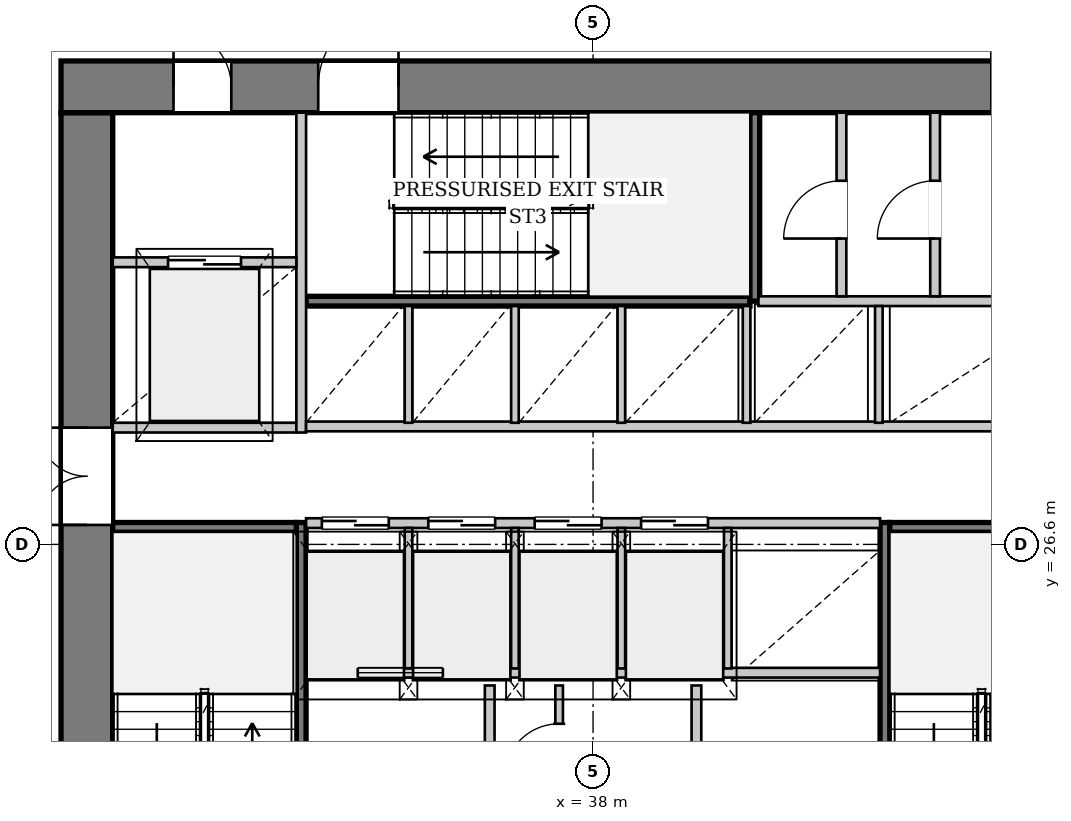
"""IFC4 building model, lengths in metres.
Left out: names, types, materials, properties, quantities, classifications, styles, units other than length and angle.
Written with IfcOpenShell. Run it as: python <this file> out.ifc"""

import sys

from ifc_helpers import new_model, si_unit, direction, frame, frame_2d, origin, place, context, subcontext, project, spatial, rectangle, extrude, source, transform, mapped, element, fill, save


model = new_model("IFC4")
c1 = context("Model", 3, precision=1e-05, world=origin(), true_north=direction((0.0, 1.0)))
c2 = subcontext(c1, "Body", "Model", "MODEL_VIEW")
j1 = project(units=[si_unit("LENGTHUNIT", "METRE"), si_unit("PLANEANGLEUNIT", "RADIAN")], contexts=[c1])
p1 = place(None, origin())
s1 = spatial("IfcSite", under=j1, at=p1, CompositionType="ELEMENT")
p2 = place(p1, origin())
s2 = spatial("IfcBuilding", under=s1, at=p2, CompositionType="ELEMENT")
p3 = place(p2, frame((0.0, 0.0, 75.9)))
s3 = spatial("IfcBuildingStorey", under=s2, at=p3, CompositionType="ELEMENT", Elevation=75.9)
p4 = place(p3, frame((29.675, 19.5, 0.0), z_axis=(0.0, 0.0, 1.0), x_axis=(0.0, 1.0, 0.0)))
e1 = element("IfcWall", 1, at=p4, inside=s3, PredefinedType="SHEAR", context=c2, shape_type="SweptSolid", body=[
    extrude(rectangle(XDim=14.2, YDim=0.85, at=frame_2d((7.1, 0.0))), origin(), (0.0, 0.0, 1.0), 3.58),
])
p5 = place(p4, frame((7.42, 0.0, 0.0)))
e2 = element("IfcOpeningElement", 2, at=p5, cuts=e1, PredefinedType="OPENING", context=c2, shape_type="SweptSolid", body=[
    extrude(rectangle(XDim=1.6, YDim=2.2, at=frame_2d((0.8, 1.1))), frame((0.0, 0.435, 0.0), z_axis=(0.0, -1.0, 0.0), x_axis=(1.0, 0.0, 0.0)), (0.0, 0.0, 1.0), 0.87),
])
p6 = place(p3, frame((29.25, 34.125, 0.0), z_axis=(0.0, 0.0, 1.0), x_axis=(1.0, 0.0, 0.0)))
e3 = element("IfcWall", 3, at=p6, inside=s3, PredefinedType="SHEAR", context=c2, shape_type="SweptSolid", body=[
    extrude(rectangle(XDim=17.5, YDim=0.85, at=frame_2d((8.75, 0.0))), origin(), (0.0, 0.0, 1.0), 3.58),
])
p7 = place(p6, frame((1.85, 0.0, 0.0)))
e4 = element("IfcOpeningElement", 4, at=p7, cuts=e3, PredefinedType="OPENING", context=c2, shape_type="SweptSolid", body=[
    extrude(rectangle(XDim=0.95, YDim=2.1, at=frame_2d((0.475, 1.05))), frame((0.0, 0.435, 0.0), z_axis=(0.0, -1.0, 0.0), x_axis=(1.0, 0.0, 0.0)), (0.0, 0.0, 1.0), 0.87),
])
p8 = place(p6, frame((4.23, 0.0, 0.0)))
e5 = element("IfcOpeningElement", 5, at=p8, cuts=e3, PredefinedType="OPENING", context=c2, shape_type="SweptSolid", body=[
    extrude(rectangle(XDim=1.32, YDim=2.2, at=frame_2d((0.66, 1.1))), frame((0.0, 0.435, 0.0), z_axis=(0.0, -1.0, 0.0), x_axis=(1.0, 0.0, 0.0)), (0.0, 0.0, 1.0), 0.87),
])
p9 = place(p6, frame((15.3, 0.0, 0.0)))
e6 = element("IfcOpeningElement", 6, at=p9, cuts=e3, PredefinedType="OPENING", context=c2, shape_type="SweptSolid", body=[
    extrude(rectangle(XDim=0.95, YDim=2.1, at=frame_2d((0.475, 1.05))), frame((0.0, 0.435, 0.0), z_axis=(0.0, -1.0, 0.0), x_axis=(1.0, 0.0, 0.0)), (0.0, 0.0, 1.0), 0.87),
])
p10 = place(p3, frame((33.2, 19.5, 0.0), z_axis=(0.0, 0.0, 1.0), x_axis=(0.0, 1.0, 0.0)))
e7 = element("IfcWall", 7, at=p10, inside=s3, PredefinedType="PARTITIONING", context=c2, shape_type="SweptSolid", body=[
    extrude(rectangle(XDim=7.46, YDim=0.16, at=frame_2d((3.73, 0.0))), origin(), (0.0, 0.0, 1.0), 3.58),
])
p11 = place(p10, frame((0.08, 0.0, 0.0)))
e8 = element("IfcOpeningElement", 8, at=p11, cuts=e7, PredefinedType="OPENING", context=c2, shape_type="SweptSolid", body=[
    extrude(rectangle(XDim=1.32, YDim=2.2, at=frame_2d((0.66, 1.1))), frame((0.0, 0.09, 0.0), z_axis=(0.0, -1.0, 0.0), x_axis=(1.0, 0.0, 0.0)), (0.0, 0.0, 1.0), 0.18),
])
p12 = place(p3, frame((30.1, 26.88, 0.0), z_axis=(0.0, 0.0, 1.0), x_axis=(1.0, 0.0, 0.0)))
e9 = element("IfcWall", 9, at=p12, inside=s3, PredefinedType="PARTITIONING", context=c2, shape_type="SweptSolid", body=[
    extrude(rectangle(XDim=3.02, YDim=0.16, at=frame_2d((1.51, 0.0))), origin(), (0.0, 0.0, 1.0), 3.58),
])
p13 = place(p3, frame((42.8, 26.96, 0.0), z_axis=(0.0, 0.0, 1.0), x_axis=(0.0, -1.0, 0.0)))
e10 = element("IfcWall", 10, at=p13, inside=s3, PredefinedType="PARTITIONING", context=c2, shape_type="SweptSolid", body=[
    extrude(rectangle(XDim=7.46, YDim=0.16, at=frame_2d((3.73, 0.0))), origin(), (0.0, 0.0, 1.0), 3.58),
])
p14 = place(p13, frame((6.06, 0.0, 0.0)))
e11 = element("IfcOpeningElement", 11, at=p14, cuts=e10, PredefinedType="OPENING", context=c2, shape_type="SweptSolid", body=[
    extrude(rectangle(XDim=1.32, YDim=2.2, at=frame_2d((0.66, 1.1))), frame((0.0, 0.09, 0.0), z_axis=(0.0, -1.0, 0.0), x_axis=(1.0, 0.0, 0.0)), (0.0, 0.0, 1.0), 0.18),
])
p15 = place(p3, frame((42.88, 26.88, 0.0), z_axis=(0.0, 0.0, 1.0), x_axis=(1.0, 0.0, 0.0)))
e12 = element("IfcWall", 12, at=p15, inside=s3, PredefinedType="PARTITIONING", context=c2, shape_type="SweptSolid", body=[
    extrude(rectangle(XDim=3.02, YDim=0.16, at=frame_2d((1.51, 0.0))), origin(), (0.0, 0.0, 1.0), 3.58),
])
p16 = place(p3, frame((33.28, 30.6, 0.0), z_axis=(0.0, 0.0, 1.0), x_axis=(1.0, 0.0, 0.0)))
e13 = element("IfcWall", 13, at=p16, inside=s3, PredefinedType="PARTITIONING", context=c2, shape_type="SweptSolid", body=[
    extrude(rectangle(XDim=7.3, YDim=0.16, at=frame_2d((3.65, 0.0))), origin(), (0.0, 0.0, 1.0), 3.58),
])
p17 = place(p3, frame((40.66, 30.6, 0.0), z_axis=(0.0, 0.0, 1.0), x_axis=(0.0, 1.0, 0.0)))
e14 = element("IfcWall", 14, at=p17, inside=s3, PredefinedType="PARTITIONING", context=c2, shape_type="SweptSolid", body=[
    extrude(rectangle(XDim=3.1, YDim=0.16, at=frame_2d((1.55, 0.0))), origin(), (0.0, 0.0, 1.0), 3.58),
])
p18 = place(p3, frame((36.3, 19.5, 0.0), z_axis=(0.0, 0.0, 1.0), x_axis=(0.0, 1.0, 0.0)))
e15 = element("IfcWall", 15, at=p18, inside=s3, PredefinedType="PARTITIONING", context=c2, shape_type="SweptSolid", body=[
    extrude(rectangle(XDim=4.78, YDim=0.16, at=frame_2d((2.39, 0.0))), origin(), (0.0, 0.0, 1.0), 3.58),
])
p19 = place(p18, frame((0.6, 0.0, 0.0)))
e16 = element("IfcOpeningElement", 16, at=p19, cuts=e15, PredefinedType="OPENING", context=c2, shape_type="SweptSolid", body=[
    extrude(rectangle(XDim=1.2, YDim=2.2, at=frame_2d((0.6, 1.1))), frame((0.0, 0.09, 0.0), z_axis=(0.0, -1.0, 0.0), x_axis=(1.0, 0.0, 0.0)), (0.0, 0.0, 1.0), 0.18),
])
p20 = place(p18, frame((2.65, 0.0, 0.0)))
e17 = element("IfcOpeningElement", 17, at=p20, cuts=e15, PredefinedType="OPENING", context=c2, shape_type="SweptSolid", body=[
    extrude(rectangle(XDim=0.95, YDim=2.1, at=frame_2d((0.475, 1.05))), frame((0.0, 0.09, 0.0), z_axis=(0.0, -1.0, 0.0), x_axis=(1.0, 0.0, 0.0)), (0.0, 0.0, 1.0), 0.18),
])
p21 = place(p3, frame((39.7, 24.28, 0.0), z_axis=(0.0, 0.0, 1.0), x_axis=(0.0, -1.0, 0.0)))
e18 = element("IfcWall", 18, at=p21, inside=s3, PredefinedType="PARTITIONING", context=c2, shape_type="SweptSolid", body=[
    extrude(rectangle(XDim=4.78, YDim=0.16, at=frame_2d((2.39, 0.0))), origin(), (0.0, 0.0, 1.0), 3.58),
])
p22 = place(p21, frame((3.12, 0.0, 0.0)))
e19 = element("IfcOpeningElement", 19, at=p22, cuts=e18, PredefinedType="OPENING", context=c2, shape_type="SweptSolid", body=[
    extrude(rectangle(XDim=1.2, YDim=2.2, at=frame_2d((0.6, 1.1))), frame((0.0, 0.09, 0.0), z_axis=(0.0, -1.0, 0.0), x_axis=(1.0, 0.0, 0.0)), (0.0, 0.0, 1.0), 0.18),
])
p23 = place(p3, frame((33.28, 24.49, 0.0), z_axis=(0.0, 0.0, 1.0), x_axis=(1.0, 0.0, 0.0)))
e20 = element("IfcWall", 20, at=p23, inside=s3, PredefinedType="PARTITIONING", context=c2, shape_type="SweptSolid", body=[
    extrude(rectangle(XDim=9.44, YDim=0.16, at=frame_2d((4.72, 0.0))), origin(), (0.0, 0.0, 1.0), 3.58),
])
p24 = place(p23, frame((0.85, 0.0, 0.95)))
e21 = element("IfcOpeningElement", 21, at=p24, cuts=e20, PredefinedType="OPENING", context=c2, shape_type="SweptSolid", body=[
    extrude(rectangle(XDim=1.4, YDim=1.8, at=frame_2d((0.7, 0.9))), frame((0.0, 0.09, 0.0), z_axis=(0.0, -1.0, 0.0), x_axis=(1.0, 0.0, 0.0)), (0.0, 0.0, 1.0), 0.18),
])
p25 = place(p3, frame((37.442, 22.1, 0.0), z_axis=(0.0, 0.0, 1.0), x_axis=(0.0, 1.0, 0.0)))
e22 = element("IfcWall", 22, at=p25, inside=s3, PredefinedType="PARTITIONING", context=c2, shape_type="SweptSolid", body=[
    extrude(rectangle(XDim=2.18, YDim=0.125, at=frame_2d((1.09, 0.0))), origin(), (0.0, 0.0, 1.0), 3.58),
])
p26 = place(p25, frame((0.65, 0.0, 0.0)))
e23 = element("IfcOpeningElement", 23, at=p26, cuts=e22, PredefinedType="OPENING", context=c2, shape_type="SweptSolid", body=[
    extrude(rectangle(XDim=0.9, YDim=2.1, at=frame_2d((0.45, 1.05))), frame((0.0, 0.073, 0.0), z_axis=(0.0, -1.0, 0.0), x_axis=(1.0, 0.0, 0.0)), (0.0, 0.0, 1.0), 0.145),
])
p27 = place(p3, frame((30.1, 28.52, 0.0), z_axis=(0.0, 0.0, 1.0), x_axis=(1.0, 0.0, 0.0)))
e24 = element("IfcWall", 24, at=p27, inside=s3, PredefinedType="PARTITIONING", context=c2, shape_type="SweptSolid", body=[
    extrude(rectangle(XDim=3.02, YDim=0.16, at=frame_2d((1.51, 0.0))), origin(), (0.0, 0.0, 1.0), 3.58),
])
p28 = place(p3, frame((33.2, 28.44, 0.0), z_axis=(0.0, 0.0, 1.0), x_axis=(0.0, 1.0, 0.0)))
e25 = element("IfcWall", 25, at=p28, inside=s3, PredefinedType="PARTITIONING", context=c2, shape_type="SweptSolid", body=[
    extrude(rectangle(XDim=5.26, YDim=0.16, at=frame_2d((2.63, 0.0))), origin(), (0.0, 0.0, 1.0), 3.58),
])
p29 = place(p3, frame((30.1, 31.24, 0.0), z_axis=(0.0, 0.0, 1.0), x_axis=(1.0, 0.0, 0.0)))
e26 = element("IfcWall", 26, at=p29, inside=s3, PredefinedType="PARTITIONING", context=c2, shape_type="SweptSolid", body=[
    extrude(rectangle(XDim=3.02, YDim=0.16, at=frame_2d((1.51, 0.0))), origin(), (0.0, 0.0, 1.0), 3.58),
])
p30 = place(p29, frame((0.91, 0.0, 0.0)))
e27 = element("IfcOpeningElement", 27, at=p30, cuts=e26, PredefinedType="OPENING", context=c2, shape_type="SweptSolid", body=[
    extrude(rectangle(XDim=1.2, YDim=2.2, at=frame_2d((0.6, 1.1))), frame((0.0, 0.09, 0.0), z_axis=(0.0, -1.0, 0.0), x_axis=(1.0, 0.0, 0.0)), (0.0, 0.0, 1.0), 0.18),
])
p31 = place(p3, frame((33.28, 26.95, 0.0), z_axis=(0.0, 0.0, 1.0), x_axis=(1.0, 0.0, 0.0)))
e28 = element("IfcWall", 28, at=p31, inside=s3, PredefinedType="PARTITIONING", context=c2, shape_type="SweptSolid", body=[
    extrude(rectangle(XDim=9.44, YDim=0.16, at=frame_2d((4.72, 0.0))), origin(), (0.0, 0.0, 1.0), 3.58),
])
p32 = place(p31, frame((0.26, 0.0, 0.0)))
e29 = element("IfcOpeningElement", 29, at=p32, cuts=e28, PredefinedType="OPENING", context=c2, shape_type="SweptSolid", body=[
    extrude(rectangle(XDim=1.1, YDim=2.2, at=frame_2d((0.55, 1.1))), frame((0.0, 0.09, 0.0), z_axis=(0.0, -1.0, 0.0), x_axis=(1.0, 0.0, 0.0)), (0.0, 0.0, 1.0), 0.18),
])
p33 = place(p31, frame((2.01, 0.0, 0.0)))
e30 = element("IfcOpeningElement", 30, at=p33, cuts=e28, PredefinedType="OPENING", context=c2, shape_type="SweptSolid", body=[
    extrude(rectangle(XDim=1.1, YDim=2.2, at=frame_2d((0.55, 1.1))), frame((0.0, 0.09, 0.0), z_axis=(0.0, -1.0, 0.0), x_axis=(1.0, 0.0, 0.0)), (0.0, 0.0, 1.0), 0.18),
])
p34 = place(p31, frame((3.76, 0.0, 0.0)))
e31 = element("IfcOpeningElement", 31, at=p34, cuts=e28, PredefinedType="OPENING", context=c2, shape_type="SweptSolid", body=[
    extrude(rectangle(XDim=1.1, YDim=2.2, at=frame_2d((0.55, 1.1))), frame((0.0, 0.09, 0.0), z_axis=(0.0, -1.0, 0.0), x_axis=(1.0, 0.0, 0.0)), (0.0, 0.0, 1.0), 0.18),
])
p35 = place(p31, frame((5.51, 0.0, 0.0)))
e32 = element("IfcOpeningElement", 32, at=p35, cuts=e28, PredefinedType="OPENING", context=c2, shape_type="SweptSolid", body=[
    extrude(rectangle(XDim=1.1, YDim=2.2, at=frame_2d((0.55, 1.1))), frame((0.0, 0.09, 0.0), z_axis=(0.0, -1.0, 0.0), x_axis=(1.0, 0.0, 0.0)), (0.0, 0.0, 1.0), 0.18),
])
for number, where, z_axis, x_axis in (
    (33, (34.965, 24.56, 0.0), (0.0, 0.0, 1.0), (0.0, 1.0, 0.0)),
    (34, (36.715, 24.56, 0.0), (0.0, 0.0, 1.0), (0.0, 1.0, 0.0)),
    (35, (38.465, 24.56, 0.0), (0.0, 0.0, 1.0), (0.0, 1.0, 0.0)),
    (36, (40.215, 24.56, 0.0), (0.0, 0.0, 1.0), (0.0, 1.0, 0.0)),
):
    element("IfcWall", number, at=place(p3, frame(where, z_axis=z_axis, x_axis=x_axis)), inside=s3, PredefinedType="PARTITIONING", context=c2, shape_type="SweptSolid", body=[
        extrude(rectangle(XDim=2.31, YDim=0.125, at=frame_2d((1.155, 0.0))), origin(), (0.0, 0.0, 1.0), 3.58),
    ])
p36 = place(p3, frame((33.28, 28.54, 0.0), z_axis=(0.0, 0.0, 1.0), x_axis=(1.0, 0.0, 0.0)))
e37 = element("IfcWall", 37, at=p36, inside=s3, PredefinedType="PARTITIONING", context=c2, shape_type="SweptSolid", body=[
    extrude(rectangle(XDim=12.62, YDim=0.16, at=frame_2d((6.31, 0.0))), origin(), (0.0, 0.0, 1.0), 3.58),
])
p37 = place(p3, frame((40.72, 30.6, 0.0), z_axis=(0.0, 0.0, 1.0), x_axis=(1.0, 0.0, 0.0)))
e38 = element("IfcWall", 38, at=p37, inside=s3, PredefinedType="PARTITIONING", context=c2, shape_type="SweptSolid", body=[
    extrude(rectangle(XDim=5.18, YDim=0.16, at=frame_2d((2.59, 0.0))), origin(), (0.0, 0.0, 1.0), 3.58),
])
for number, where, z_axis, x_axis in (
    (39, (34.965, 28.6, 0.0), (0.0, 0.0, 1.0), (0.0, 1.0, 0.0)),
    (40, (36.715, 28.6, 0.0), (0.0, 0.0, 1.0), (0.0, 1.0, 0.0)),
    (41, (38.465, 28.6, 0.0), (0.0, 0.0, 1.0), (0.0, 1.0, 0.0)),
    (42, (40.525, 28.6, 0.0), (0.0, 0.0, 1.0), (0.0, 1.0, 0.0)),
    (43, (42.7, 28.6, 0.0), (0.0, 0.0, 1.0), (0.0, 1.0, 0.0)),
):
    element("IfcWall", number, at=place(p3, frame(where, z_axis=z_axis, x_axis=x_axis)), inside=s3, PredefinedType="PARTITIONING", context=c2, shape_type="SweptSolid", body=[
        extrude(rectangle(XDim=1.92, YDim=0.125, at=frame_2d((0.96, 0.0))), origin(), (0.0, 0.0, 1.0), 3.58),
    ])
p38 = place(p3, frame((42.085, 30.68, 0.0), z_axis=(0.0, 0.0, 1.0), x_axis=(0.0, 1.0, 0.0)))
e44 = element("IfcWall", 44, at=p38, inside=s3, PredefinedType="PARTITIONING", context=c2, shape_type="SweptSolid", body=[
    extrude(rectangle(XDim=3.02, YDim=0.16, at=frame_2d((1.51, 0.0))), origin(), (0.0, 0.0, 1.0), 3.58),
])
p39 = place(p38, frame((0.95, 0.0, 0.0)))
e45 = element("IfcOpeningElement", 45, at=p39, cuts=e44, PredefinedType="OPENING", context=c2, shape_type="SweptSolid", body=[
    extrude(rectangle(XDim=0.95, YDim=2.1, at=frame_2d((0.475, 1.05))), frame((0.0, 0.09, 0.0), z_axis=(0.0, -1.0, 0.0), x_axis=(1.0, 0.0, 0.0)), (0.0, 0.0, 1.0), 0.18),
])
p40 = place(p3, frame((43.625, 30.68, 0.0), z_axis=(0.0, 0.0, 1.0), x_axis=(0.0, 1.0, 0.0)))
e46 = element("IfcWall", 46, at=p40, inside=s3, PredefinedType="PARTITIONING", context=c2, shape_type="SweptSolid", body=[
    extrude(rectangle(XDim=3.02, YDim=0.16, at=frame_2d((1.51, 0.0))), origin(), (0.0, 0.0, 1.0), 3.58),
])
p41 = place(p40, frame((0.95, 0.0, 0.0)))
e47 = element("IfcOpeningElement", 47, at=p41, cuts=e46, PredefinedType="OPENING", context=c2, shape_type="SweptSolid", body=[
    extrude(rectangle(XDim=0.95, YDim=2.1, at=frame_2d((0.475, 1.05))), frame((0.0, 0.09, 0.0), z_axis=(0.0, -1.0, 0.0), x_axis=(1.0, 0.0, 0.0)), (0.0, 0.0, 1.0), 0.18),
])
m1 = source(origin(), c2, "Body", "SweptSolid", [
    extrude(rectangle(XDim=1.6, YDim=2.2, at=frame_2d((0.8, 1.1))), frame((0.0, 0.025, 0.0), z_axis=(0.0, -1.0, 0.0), x_axis=(1.0, 0.0, 0.0)), (0.0, 0.0, 1.0), 0.05),
])
p42 = place(p5, origin())
e48 = element("IfcDoor", 48, at=p42, inside=s3, OperationType="DOUBLE_DOOR_SINGLE_SWING", PredefinedType="DOOR", context=c2, shape_type="MappedRepresentation", body=[
    mapped(m1, transform((0.0, 0.0, 0.0), x_axis=(1.0, 0.0, 0.0), y_axis=(0.0, 1.0, 0.0), z_axis=(0.0, 0.0, 1.0), scale=1.0)),
])
fill(e2, e48)
m2 = source(origin(), c2, "Body", "SweptSolid", [
    extrude(rectangle(XDim=0.95, YDim=2.1, at=frame_2d((0.475, 1.05))), frame((0.0, 0.025, 0.0), z_axis=(0.0, -1.0, 0.0), x_axis=(1.0, 0.0, 0.0)), (0.0, 0.0, 1.0), 0.05),
])
p43 = place(p7, origin())
e49 = element("IfcDoor", 49, at=p43, inside=s3, OperationType="SINGLE_SWING_LEFT", PredefinedType="DOOR", context=c2, shape_type="MappedRepresentation", body=[
    mapped(m2, transform((0.0, 0.0, 0.0), x_axis=(1.0, 0.0, 0.0), y_axis=(0.0, 1.0, 0.0), z_axis=(0.0, 0.0, 1.0), scale=1.0)),
])
fill(e4, e49)
m3 = source(origin(), c2, "Body", "SweptSolid", [
    extrude(rectangle(XDim=1.32, YDim=2.2, at=frame_2d((0.66, 1.1))), frame((0.0, 0.025, 0.0), z_axis=(0.0, -1.0, 0.0), x_axis=(1.0, 0.0, 0.0)), (0.0, 0.0, 1.0), 0.05),
])
p44 = place(p8, origin())
e50 = element("IfcDoor", 50, at=p44, inside=s3, OperationType="SINGLE_SWING_RIGHT", PredefinedType="DOOR", context=c2, shape_type="MappedRepresentation", body=[
    mapped(m3, transform((0.0, 0.0, 0.0), x_axis=(1.0, 0.0, 0.0), y_axis=(0.0, 1.0, 0.0), z_axis=(0.0, 0.0, 1.0), scale=1.0)),
])
fill(e5, e50)
m4 = source(origin(), c2, "Body", "SweptSolid", [
    extrude(rectangle(XDim=0.9, YDim=2.1, at=frame_2d((0.45, 1.05))), frame((0.0, 0.025, 0.0), z_axis=(0.0, -1.0, 0.0), x_axis=(1.0, 0.0, 0.0)), (0.0, 0.0, 1.0), 0.05),
])
p45 = place(p26, origin())
e51 = element("IfcDoor", 51, at=p45, inside=s3, OperationType="SINGLE_SWING_LEFT", PredefinedType="DOOR", context=c2, shape_type="MappedRepresentation", body=[
    mapped(m4, transform((0.0, 0.0, 0.0), x_axis=(1.0, 0.0, 0.0), y_axis=(0.0, 1.0, 0.0), z_axis=(0.0, 0.0, 1.0), scale=1.0)),
])
fill(e23, e51)
m5 = source(origin(), c2, "Body", "SweptSolid", [
    extrude(rectangle(XDim=1.2, YDim=2.2, at=frame_2d((0.6, 1.1))), frame((0.0, 0.025, 0.0), z_axis=(0.0, -1.0, 0.0), x_axis=(1.0, 0.0, 0.0)), (0.0, 0.0, 1.0), 0.05),
])
p46 = place(p30, origin())
e52 = element("IfcDoor", 52, at=p46, inside=s3, OperationType="DOUBLE_DOOR_SLIDING", PredefinedType="DOOR", context=c2, shape_type="MappedRepresentation", body=[
    mapped(m5, transform((0.0, 0.0, 0.0), x_axis=(1.0, 0.0, 0.0), y_axis=(0.0, 1.0, 0.0), z_axis=(0.0, 0.0, 1.0), scale=1.0)),
])
fill(e27, e52)
m6 = source(origin(), c2, "Body", "SweptSolid", [
    extrude(rectangle(XDim=1.1, YDim=2.2, at=frame_2d((0.55, 1.1))), frame((0.0, 0.025, 0.0), z_axis=(0.0, -1.0, 0.0), x_axis=(1.0, 0.0, 0.0)), (0.0, 0.0, 1.0), 0.05),
])
p47 = place(p32, origin())
e53 = element("IfcDoor", 53, at=p47, inside=s3, OperationType="DOUBLE_DOOR_SLIDING", PredefinedType="DOOR", context=c2, shape_type="MappedRepresentation", body=[
    mapped(m6, transform((0.0, 0.0, 0.0), x_axis=(1.0, 0.0, 0.0), y_axis=(0.0, 1.0, 0.0), z_axis=(0.0, 0.0, 1.0), scale=1.0)),
])
fill(e29, e53)
p48 = place(p33, origin())
e54 = element("IfcDoor", 54, at=p48, inside=s3, OperationType="DOUBLE_DOOR_SLIDING", PredefinedType="DOOR", context=c2, shape_type="MappedRepresentation", body=[
    mapped(m6, transform((0.0, 0.0, 0.0), x_axis=(1.0, 0.0, 0.0), y_axis=(0.0, 1.0, 0.0), z_axis=(0.0, 0.0, 1.0), scale=1.0)),
])
fill(e30, e54)
p49 = place(p34, origin())
e55 = element("IfcDoor", 55, at=p49, inside=s3, OperationType="DOUBLE_DOOR_SLIDING", PredefinedType="DOOR", context=c2, shape_type="MappedRepresentation", body=[
    mapped(m6, transform((0.0, 0.0, 0.0), x_axis=(1.0, 0.0, 0.0), y_axis=(0.0, 1.0, 0.0), z_axis=(0.0, 0.0, 1.0), scale=1.0)),
])
fill(e31, e55)
p50 = place(p35, origin())
e56 = element("IfcDoor", 56, at=p50, inside=s3, OperationType="DOUBLE_DOOR_SLIDING", PredefinedType="DOOR", context=c2, shape_type="MappedRepresentation", body=[
    mapped(m6, transform((0.0, 0.0, 0.0), x_axis=(1.0, 0.0, 0.0), y_axis=(0.0, 1.0, 0.0), z_axis=(0.0, 0.0, 1.0), scale=1.0)),
])
fill(e32, e56)
p51 = place(p39, origin())
e57 = element("IfcDoor", 57, at=p51, inside=s3, OperationType="SINGLE_SWING_LEFT", PredefinedType="DOOR", context=c2, shape_type="MappedRepresentation", body=[
    mapped(m2, transform((0.0, 0.0, 0.0), x_axis=(1.0, 0.0, 0.0), y_axis=(0.0, 1.0, 0.0), z_axis=(0.0, 0.0, 1.0), scale=1.0)),
])
fill(e45, e57)
p52 = place(p41, origin())
e58 = element("IfcDoor", 58, at=p52, inside=s3, OperationType="SINGLE_SWING_LEFT", PredefinedType="DOOR", context=c2, shape_type="MappedRepresentation", body=[
    mapped(m2, transform((0.0, 0.0, 0.0), x_axis=(1.0, 0.0, 0.0), y_axis=(0.0, 1.0, 0.0), z_axis=(0.0, 0.0, 1.0), scale=1.0)),
])
fill(e47, e58)
m7 = source(origin(), c2, "Body", "SweptSolid", [
    extrude(rectangle(XDim=1.4, YDim=1.8, at=frame_2d((0.7, 0.9))), frame((0.0, 0.03, 0.0), z_axis=(0.0, -1.0, 0.0), x_axis=(1.0, 0.0, 0.0)), (0.0, 0.0, 1.0), 0.06),
])
p53 = place(p24, origin())
e59 = element("IfcWindow", 59, at=p53, inside=s3, PartitioningType="SINGLE_PANEL", PredefinedType="WINDOW", context=c2, shape_type="MappedRepresentation", body=[
    mapped(m7, transform((0.0, 0.0, 0.0), x_axis=(1.0, 0.0, 0.0), y_axis=(0.0, 1.0, 0.0), z_axis=(0.0, 0.0, 1.0), scale=1.0)),
])
fill(e21, e59)
save(model, sys.argv[1])
